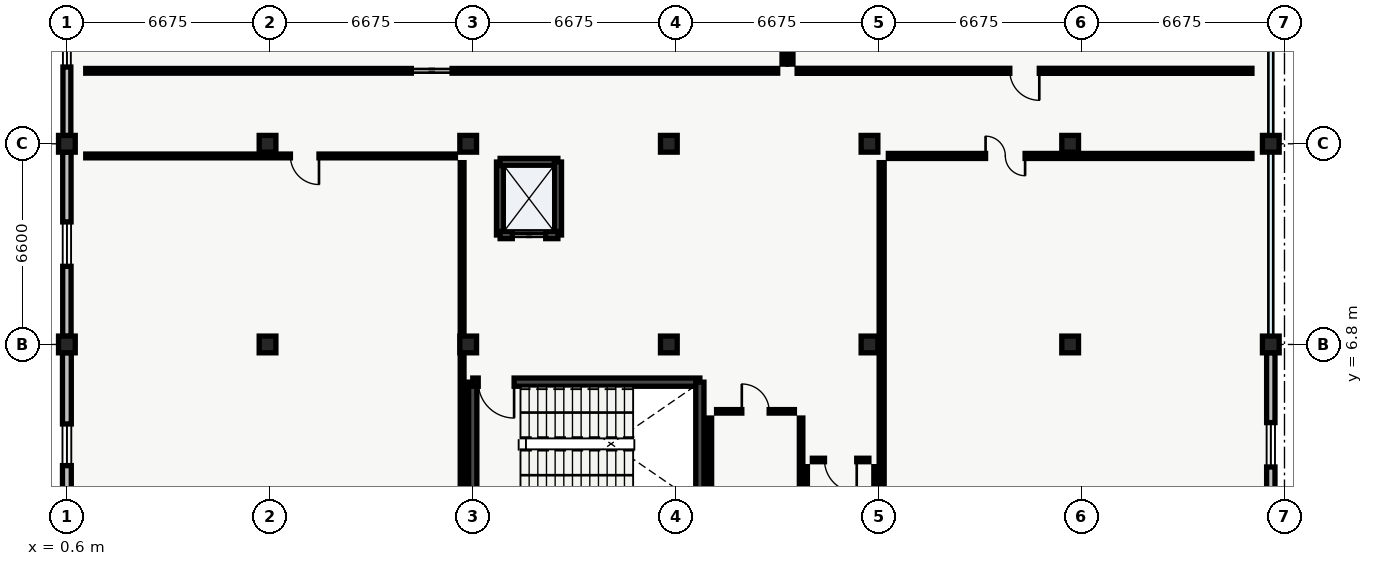
"""IFC4 building model, lengths in metres.
Left out: names, types, materials, properties, quantities, classifications, styles, units other than length and angle.
Written with IfcOpenShell. Run it as: python <this file> out.ifc"""

import sys

from ifc_helpers import new_model, si_unit, direction, frame, frame_2d, origin, origin_2d, place, context, subcontext, project, spatial, rectangle, extrude, element, fill, save


model = new_model("IFC4")
c1 = context("Model", 3, precision=1e-05, world=origin(), true_north=direction((0.0, 1.0)))
c2 = subcontext(c1, "Body", "Model", "MODEL_VIEW")
j1 = project(units=[si_unit("LENGTHUNIT", "METRE"), si_unit("PLANEANGLEUNIT", "RADIAN")], contexts=[c1])
p1 = place(None, origin())
s1 = spatial("IfcSite", under=j1, at=p1, CompositionType="ELEMENT")
p2 = place(p1, origin())
s2 = spatial("IfcBuilding", under=s1, at=p2, CompositionType="ELEMENT")
p3 = place(p2, frame((0.0, 0.0, 14.1)))
s3 = spatial("IfcBuildingStorey", under=s2, at=p3, CompositionType="ELEMENT", Elevation=14.1)
for number, where, z_axis, x_axis in (
    (1, (0.6, 6.8, 0.0), (0.0, 0.0, 1.0), (1.0, 0.0, 0.0)),
    (2, (0.6, 13.4, 0.0), (0.0, 0.0, 1.0), (1.0, 0.0, 0.0)),
    (3, (7.2, 6.8, 0.0), (0.0, 0.0, 1.0), (1.0, 0.0, 0.0)),
    (4, (7.2, 13.4, 0.0), (0.0, 0.0, 1.0), (1.0, 0.0, 0.0)),
    (5, (13.8, 6.8, 0.0), (0.0, 0.0, 1.0), (1.0, 0.0, 0.0)),
    (6, (13.8, 13.4, 0.0), (0.0, 0.0, 1.0), (1.0, 0.0, 0.0)),
    (7, (20.4, 6.8, 0.0), (0.0, 0.0, 1.0), (1.0, 0.0, 0.0)),
    (8, (20.4, 13.4, 0.0), (0.0, 0.0, 1.0), (1.0, 0.0, 0.0)),
    (9, (27.0, 6.8, 0.0), (0.0, 0.0, 1.0), (1.0, 0.0, 0.0)),
    (10, (27.0, 13.4, 0.0), (0.0, 0.0, 1.0), (1.0, 0.0, 0.0)),
    (11, (33.6, 6.8, 0.0), (0.0, 0.0, 1.0), (1.0, 0.0, 0.0)),
    (12, (33.6, 13.4, 0.0), (0.0, 0.0, 1.0), (1.0, 0.0, 0.0)),
    (13, (40.2, 6.8, 0.0), (0.0, 0.0, 1.0), (1.0, 0.0, 0.0)),
    (14, (40.2, 13.4, 0.0), (0.0, 0.0, 1.0), (1.0, 0.0, 0.0)),
):
    element("IfcColumn", number, at=place(p3, frame(where, z_axis=z_axis, x_axis=x_axis)), inside=s3, PredefinedType="COLUMN", context=c2, shape_type="SweptSolid", body=[
        extrude(rectangle(XDim=0.55, YDim=0.55, at=origin_2d()), origin(), (0.0, 0.0, 1.0), 4.3),
    ])
p4 = place(p3, frame((0.6, 0.47, 0.0), z_axis=(0.0, 0.0, 1.0), x_axis=(0.0, 1.0, 0.0)))
e15 = element("IfcWall", 15, at=p4, inside=s3, PredefinedType="STANDARD", context=c2, shape_type="SweptSolid", body=[
    extrude(rectangle(XDim=6.06, YDim=0.29, at=frame_2d((3.03, 0.0))), origin(), (0.0, 0.0, 1.0), 3.785),
])
p5 = place(p4, frame((2.345, 0.0, 0.95)))
e16 = element("IfcOpeningElement", 16, at=p5, cuts=e15, PredefinedType="OPENING", context=c2, shape_type="SweptSolid", body=[
    extrude(rectangle(XDim=1.37, YDim=1.42, at=frame_2d((0.685, 0.71))), frame((0.0, 0.145, 0.0), z_axis=(0.0, -1.0, 0.0), x_axis=(1.0, 0.0, 0.0)), (0.0, 0.0, 1.0), 0.29),
])
p6 = place(p3, frame((0.6, 7.07, 0.0), z_axis=(0.0, 0.0, 1.0), x_axis=(0.0, 1.0, 0.0)))
e17 = element("IfcWall", 17, at=p6, inside=s3, PredefinedType="STANDARD", context=c2, shape_type="SweptSolid", body=[
    extrude(rectangle(XDim=6.06, YDim=0.275, at=frame_2d((3.03, 0.0))), origin(), (0.0, 0.0, 1.0), 3.785),
])
p7 = place(p6, frame((2.3, 0.0, 0.95)))
e18 = element("IfcOpeningElement", 18, at=p7, cuts=e17, PredefinedType="OPENING", context=c2, shape_type="SweptSolid", body=[
    extrude(rectangle(XDim=1.46, YDim=1.44, at=frame_2d((0.73, 0.72))), frame((0.0, 0.137, 0.0), z_axis=(0.0, -1.0, 0.0), x_axis=(1.0, 0.0, 0.0)), (0.0, 0.0, 1.0), 0.275),
])
p8 = place(p3, frame((0.6, 13.67, 0.0), z_axis=(0.0, 0.0, 1.0), x_axis=(0.0, 1.0, 0.0)))
e19 = element("IfcWall", 19, at=p8, inside=s3, PredefinedType="STANDARD", context=c2, shape_type="SweptSolid", body=[
    extrude(rectangle(XDim=6.06, YDim=0.26, at=frame_2d((3.03, 0.0))), origin(), (0.0, 0.0, 1.0), 3.785),
])
p9 = place(p8, frame((2.255, 0.0, 0.95)))
e20 = element("IfcOpeningElement", 20, at=p9, cuts=e19, PredefinedType="OPENING", context=c2, shape_type="SweptSolid", body=[
    extrude(rectangle(XDim=1.55, YDim=1.46, at=frame_2d((0.775, 0.73))), frame((0.0, 0.13, 0.0), z_axis=(0.0, -1.0, 0.0), x_axis=(1.0, 0.0, 0.0)), (0.0, 0.0, 1.0), 0.26),
])
p10 = place(p3, frame((40.2, 6.53, 0.0), z_axis=(0.0, 0.0, 1.0), x_axis=(0.0, -1.0, 0.0)))
e21 = element("IfcWall", 21, at=p10, inside=s3, PredefinedType="STANDARD", context=c2, shape_type="SweptSolid", body=[
    extrude(rectangle(XDim=6.06, YDim=0.275, at=frame_2d((3.03, 0.0))), origin(), (0.0, 0.0, 1.0), 3.785),
])
p11 = place(p10, frame((2.3, 0.0, 0.95)))
e22 = element("IfcOpeningElement", 22, at=p11, cuts=e21, PredefinedType="OPENING", context=c2, shape_type="SweptSolid", body=[
    extrude(rectangle(XDim=1.46, YDim=1.44, at=frame_2d((0.73, 0.72))), frame((0.0, 0.137, 0.0), z_axis=(0.0, -1.0, 0.0), x_axis=(1.0, 0.0, 0.0)), (0.0, 0.0, 1.0), 0.275),
])
p12 = place(p3, frame((13.95, 1.5, 0.0), z_axis=(0.0, 0.0, 1.0), x_axis=(0.0, 1.0, 0.0)))
e23 = element("IfcWall", 23, at=p12, inside=s3, PredefinedType="SHEAR", context=c2, shape_type="SweptSolid", body=[
    extrude(rectangle(XDim=4.06, YDim=0.27, at=frame_2d((2.03, 0.0))), origin(), (0.0, 0.0, 1.0), 4.28),
])
p13 = place(p3, frame((13.95, 5.56, 0.0), z_axis=(0.0, 0.0, 1.0), x_axis=(1.0, 0.0, 0.0)))
e24 = element("IfcWall", 24, at=p13, inside=s3, PredefinedType="SHEAR", context=c2, shape_type="SweptSolid", body=[
    extrude(rectangle(XDim=7.47, YDim=0.27, at=frame_2d((3.735, 0.0))), origin(), (0.0, 0.0, 1.0), 4.28),
])
p14 = place(p13, frame((0.18, 0.0, 0.0)))
e25 = element("IfcOpeningElement", 25, at=p14, cuts=e24, PredefinedType="OPENING", context=c2, shape_type="SweptSolid", body=[
    extrude(rectangle(XDim=1.18, YDim=2.15, at=frame_2d((0.59, 1.075))), frame((0.0, 0.135, 0.0), z_axis=(0.0, -1.0, 0.0), x_axis=(1.0, 0.0, 0.0)), (0.0, 0.0, 1.0), 0.27),
])
p15 = place(p3, frame((21.42, 5.56, 0.0), z_axis=(0.0, 0.0, 1.0), x_axis=(0.0, -1.0, 0.0)))
e26 = element("IfcWall", 26, at=p15, inside=s3, PredefinedType="SHEAR", context=c2, shape_type="SweptSolid", body=[
    extrude(rectangle(XDim=4.06, YDim=0.27, at=frame_2d((2.03, 0.0))), origin(), (0.0, 0.0, 1.0), 4.28),
])
p16 = place(p3, frame((14.85, 10.4, 0.0), z_axis=(0.0, 0.0, 1.0), x_axis=(0.0, 1.0, 0.0)))
e27 = element("IfcWall", 27, at=p16, inside=s3, PredefinedType="SHEAR", context=c2, shape_type="SweptSolid", body=[
    extrude(rectangle(XDim=2.4, YDim=0.24, at=frame_2d((1.2, 0.0))), origin(), (0.0, 0.0, 1.0), 4.28),
])
p17 = place(p3, frame((14.85, 12.8, 0.0), z_axis=(0.0, 0.0, 1.0), x_axis=(1.0, 0.0, 0.0)))
e28 = element("IfcWall", 28, at=p17, inside=s3, PredefinedType="SHEAR", context=c2, shape_type="SweptSolid", body=[
    extrude(rectangle(XDim=1.9, YDim=0.24, at=frame_2d((0.95, 0.0))), origin(), (0.0, 0.0, 1.0), 4.28),
])
p18 = place(p3, frame((16.75, 12.8, 0.0), z_axis=(0.0, 0.0, 1.0), x_axis=(0.0, -1.0, 0.0)))
e29 = element("IfcWall", 29, at=p18, inside=s3, PredefinedType="SHEAR", context=c2, shape_type="SweptSolid", body=[
    extrude(rectangle(XDim=2.4, YDim=0.24, at=frame_2d((1.2, 0.0))), origin(), (0.0, 0.0, 1.0), 4.28),
])
p19 = place(p3, frame((16.75, 10.4, 0.0), z_axis=(0.0, 0.0, 1.0), x_axis=(-1.0, 0.0, 0.0)))
e30 = element("IfcWall", 30, at=p19, inside=s3, PredefinedType="SHEAR", context=c2, shape_type="SweptSolid", body=[
    extrude(rectangle(XDim=1.9, YDim=0.24, at=frame_2d((0.95, 0.0))), origin(), (0.0, 0.0, 1.0), 4.28),
])
p20 = place(p19, frame((0.4, 0.0, 0.0)))
e31 = element("IfcOpeningElement", 31, at=p20, cuts=e30, PredefinedType="OPENING", context=c2, shape_type="SweptSolid", body=[
    extrude(rectangle(XDim=1.1, YDim=2.2, at=frame_2d((0.55, 1.1))), frame((0.0, 0.12, 0.0), z_axis=(0.0, -1.0, 0.0), x_axis=(1.0, 0.0, 0.0)), (0.0, 0.0, 1.0), 0.24),
])
p21 = place(p3, frame((24.75, 0.82, 0.0), z_axis=(0.0, 0.0, 1.0), x_axis=(0.0, 1.0, 0.0)))
e32 = element("IfcWall", 32, at=p21, inside=s3, PredefinedType="PARTITIONING", context=c2, shape_type="SweptSolid", body=[
    extrude(rectangle(XDim=3.56, YDim=0.115, at=frame_2d((1.78, 0.0))), origin(), (0.0, 0.0, 1.0), 3.95),
])
p22 = place(p3, frame((24.53, 4.6, 0.0), z_axis=(0.0, 0.0, 1.0), x_axis=(-1.0, 0.0, 0.0)))
e33 = element("IfcWall", 33, at=p22, inside=s3, PredefinedType="PARTITIONING", context=c2, shape_type="SweptSolid", body=[
    extrude(rectangle(XDim=2.56, YDim=0.115, at=frame_2d((1.28, 0.0))), origin(), (0.0, 0.0, 1.0), 3.95),
])
p23 = place(p22, frame((0.83, 0.0, 0.0)))
e34 = element("IfcOpeningElement", 34, at=p23, cuts=e33, PredefinedType="OPENING", context=c2, shape_type="SweptSolid", body=[
    extrude(rectangle(XDim=0.9, YDim=2.1, at=frame_2d((0.45, 1.05))), frame((0.0, 0.058, 0.0), z_axis=(0.0, -1.0, 0.0), x_axis=(1.0, 0.0, 0.0)), (0.0, 0.0, 1.0), 0.115),
])
p24 = place(p3, frame((21.75, 4.38, 0.0), z_axis=(0.0, 0.0, 1.0), x_axis=(0.0, -1.0, 0.0)))
e35 = element("IfcWall", 35, at=p24, inside=s3, PredefinedType="PARTITIONING", context=c2, shape_type="SweptSolid", body=[
    extrude(rectangle(XDim=3.56, YDim=0.115, at=frame_2d((1.78, 0.0))), origin(), (0.0, 0.0, 1.0), 3.95),
])
p25 = place(p3, frame((27.2, 0.82, 0.0), z_axis=(0.0, 0.0, 1.0), x_axis=(0.0, 1.0, 0.0)))
e36 = element("IfcWall", 36, at=p25, inside=s3, PredefinedType="PARTITIONING", context=c2, shape_type="SweptSolid", body=[
    extrude(rectangle(XDim=1.96, YDim=0.115, at=frame_2d((0.98, 0.0))), origin(), (0.0, 0.0, 1.0), 3.685),
])
p26 = place(p3, frame((26.98, 3.0, 0.0), z_axis=(0.0, 0.0, 1.0), x_axis=(-1.0, 0.0, 0.0)))
e37 = element("IfcWall", 37, at=p26, inside=s3, PredefinedType="PARTITIONING", context=c2, shape_type="SweptSolid", body=[
    extrude(rectangle(XDim=1.86, YDim=0.115, at=frame_2d((0.93, 0.0))), origin(), (0.0, 0.0, 1.0), 3.95),
])
p27 = place(p26, frame((0.4, 0.0, 0.0)))
e38 = element("IfcOpeningElement", 38, at=p27, cuts=e37, PredefinedType="OPENING", context=c2, shape_type="SweptSolid", body=[
    extrude(rectangle(XDim=1.06, YDim=2.12, at=frame_2d((0.53, 1.06))), frame((0.0, 0.058, 0.0), z_axis=(0.0, -1.0, 0.0), x_axis=(1.0, 0.0, 0.0)), (0.0, 0.0, 1.0), 0.115),
])
p28 = place(p3, frame((24.9, 2.78, 0.0), z_axis=(0.0, 0.0, 1.0), x_axis=(0.0, -1.0, 0.0)))
e39 = element("IfcWall", 39, at=p28, inside=s3, PredefinedType="PARTITIONING", context=c2, shape_type="SweptSolid", body=[
    extrude(rectangle(XDim=1.96, YDim=0.115, at=frame_2d((0.98, 0.0))), origin(), (0.0, 0.0, 1.0), 3.95),
])
p29 = place(p3, frame((1.22, 15.8, 0.0), z_axis=(0.0, 0.0, 1.0), x_axis=(1.0, 0.0, 0.0)))
e40 = element("IfcWall", 40, at=p29, inside=s3, PredefinedType="PARTITIONING", context=c2, shape_type="SweptSolid", body=[
    extrude(rectangle(XDim=22.76, YDim=0.155, at=frame_2d((11.38, 0.0))), origin(), (0.0, 0.0, 1.0), 3.885),
])
p30 = place(p29, frame((10.71, 0.0, 0.0)))
e41 = element("IfcOpeningElement", 41, at=p30, cuts=e40, PredefinedType="OPENING", context=c2, shape_type="SweptSolid", body=[
    extrude(rectangle(XDim=1.34, YDim=2.2, at=frame_2d((0.67, 1.1))), frame((0.0, 0.078, 0.0), z_axis=(0.0, -1.0, 0.0), x_axis=(1.0, 0.0, 0.0)), (0.0, 0.0, 1.0), 0.155),
])
p31 = place(p3, frame((24.2, 16.02, 0.0), z_axis=(0.0, 0.0, 1.0), x_axis=(0.0, 1.0, 0.0)))
e42 = element("IfcWall", 42, at=p31, inside=s3, PredefinedType="PARTITIONING", context=c2, shape_type="SweptSolid", body=[
    extrude(rectangle(XDim=9.96, YDim=0.155, at=frame_2d((4.98, 0.0))), origin(), (0.0, 0.0, 1.0), 3.95),
])
p32 = place(p3, frame((24.62, 15.8, 0.0), z_axis=(0.0, 0.0, 1.0), x_axis=(1.0, 0.0, 0.0)))
e43 = element("IfcWall", 43, at=p32, inside=s3, PredefinedType="PARTITIONING", context=c2, shape_type="SweptSolid", body=[
    extrude(rectangle(XDim=14.96, YDim=0.165, at=frame_2d((7.48, 0.0))), origin(), (0.0, 0.0, 1.0), 3.885),
])
p33 = place(p32, frame((6.995, 0.0, 0.0)))
e44 = element("IfcOpeningElement", 44, at=p33, cuts=e43, PredefinedType="OPENING", context=c2, shape_type="SweptSolid", body=[
    extrude(rectangle(XDim=0.97, YDim=2.12, at=frame_2d((0.485, 1.06))), frame((0.0, 0.083, 0.0), z_axis=(0.0, -1.0, 0.0), x_axis=(1.0, 0.0, 0.0)), (0.0, 0.0, 1.0), 0.165),
])
p34 = place(p3, frame((24.4, 25.98, 0.0), z_axis=(0.0, 0.0, 1.0), x_axis=(0.0, -1.0, 0.0)))
e45 = element("IfcWall", 45, at=p34, inside=s3, PredefinedType="PARTITIONING", context=c2, shape_type="SweptSolid", body=[
    extrude(rectangle(XDim=9.96, YDim=0.165, at=frame_2d((4.98, 0.0))), origin(), (0.0, 0.0, 1.0), 3.95),
])
p35 = place(p3, frame((13.6, 0.82, 0.0), z_axis=(0.0, 0.0, 1.0), x_axis=(0.0, 1.0, 0.0)))
e46 = element("IfcWall", 46, at=p35, inside=s3, PredefinedType="PARTITIONING", context=c2, shape_type="SweptSolid", body=[
    extrude(rectangle(XDim=11.96, YDim=0.125, at=frame_2d((5.98, 0.0))), origin(), (0.0, 0.0, 1.0), 3.685),
])
p36 = place(p3, frame((13.38, 13.0, 0.0), z_axis=(0.0, 0.0, 1.0), x_axis=(-1.0, 0.0, 0.0)))
e47 = element("IfcWall", 47, at=p36, inside=s3, PredefinedType="PARTITIONING", context=c2, shape_type="SweptSolid", body=[
    extrude(rectangle(XDim=12.16, YDim=0.125, at=frame_2d((6.08, 0.0))), origin(), (0.0, 0.0, 1.0), 3.95),
])
p37 = place(p36, frame((4.488, 0.0, 0.0)))
e48 = element("IfcOpeningElement", 48, at=p37, cuts=e47, PredefinedType="OPENING", context=c2, shape_type="SweptSolid", body=[
    extrude(rectangle(XDim=0.94, YDim=2.12, at=frame_2d((0.47, 1.06))), frame((0.0, 0.062, 0.0), z_axis=(0.0, -1.0, 0.0), x_axis=(1.0, 0.0, 0.0)), (0.0, 0.0, 1.0), 0.125),
])
p38 = place(p3, frame((39.58, 13.0, 0.0), z_axis=(0.0, 0.0, 1.0), x_axis=(-1.0, 0.0, 0.0)))
e49 = element("IfcWall", 49, at=p38, inside=s3, PredefinedType="PARTITIONING", context=c2, shape_type="SweptSolid", body=[
    extrude(rectangle(XDim=11.96, YDim=0.165, at=frame_2d((5.98, 0.0))), origin(), (0.0, 0.0, 1.0), 3.95),
])
p39 = place(p38, frame((7.462, 0.0, 0.0)))
e50 = element("IfcOpeningElement", 50, at=p39, cuts=e49, PredefinedType="OPENING", context=c2, shape_type="SweptSolid", body=[
    extrude(rectangle(XDim=1.3, YDim=2.18, at=frame_2d((0.65, 1.09))), frame((0.0, 0.083, 0.0), z_axis=(0.0, -1.0, 0.0), x_axis=(1.0, 0.0, 0.0)), (0.0, 0.0, 1.0), 0.165),
])
p40 = place(p3, frame((27.4, 12.78, 0.0), z_axis=(0.0, 0.0, 1.0), x_axis=(0.0, -1.0, 0.0)))
e51 = element("IfcWall", 51, at=p40, inside=s3, PredefinedType="PARTITIONING", context=c2, shape_type="SweptSolid", body=[
    extrude(rectangle(XDim=11.96, YDim=0.165, at=frame_2d((5.98, 0.0))), origin(), (0.0, 0.0, 1.0), 3.95),
])
p41 = place(p5, origin())
e52 = element("IfcWindow", 52, at=p41, inside=s3, PartitioningType="SINGLE_PANEL", PredefinedType="WINDOW", context=c2, shape_type="SweptSolid", body=[
    extrude(rectangle(XDim=1.37, YDim=1.42, at=frame_2d((0.685, 0.71))), frame((0.0, 0.03, 0.0), z_axis=(0.0, -1.0, 0.0), x_axis=(1.0, 0.0, 0.0)), (0.0, 0.0, 1.0), 0.06),
])
fill(e16, e52)
p42 = place(p7, origin())
e53 = element("IfcWindow", 53, at=p42, inside=s3, PartitioningType="SINGLE_PANEL", PredefinedType="WINDOW", context=c2, shape_type="SweptSolid", body=[
    extrude(rectangle(XDim=1.46, YDim=1.44, at=frame_2d((0.73, 0.72))), frame((0.0, 0.03, 0.0), z_axis=(0.0, -1.0, 0.0), x_axis=(1.0, 0.0, 0.0)), (0.0, 0.0, 1.0), 0.06),
])
fill(e18, e53)
p43 = place(p9, origin())
e54 = element("IfcWindow", 54, at=p43, inside=s3, PartitioningType="SINGLE_PANEL", PredefinedType="WINDOW", context=c2, shape_type="SweptSolid", body=[
    extrude(rectangle(XDim=1.55, YDim=1.46, at=frame_2d((0.775, 0.73))), frame((0.0, 0.03, 0.0), z_axis=(0.0, -1.0, 0.0), x_axis=(1.0, 0.0, 0.0)), (0.0, 0.0, 1.0), 0.06),
])
fill(e20, e54)
p44 = place(p11, origin())
e55 = element("IfcWindow", 55, at=p44, inside=s3, PartitioningType="SINGLE_PANEL", PredefinedType="WINDOW", context=c2, shape_type="SweptSolid", body=[
    extrude(rectangle(XDim=1.46, YDim=1.44, at=frame_2d((0.73, 0.72))), frame((0.0, 0.03, 0.0), z_axis=(0.0, -1.0, 0.0), x_axis=(1.0, 0.0, 0.0)), (0.0, 0.0, 1.0), 0.06),
])
fill(e22, e55)
p45 = place(p14, origin())
e56 = element("IfcDoor", 56, at=p45, inside=s3, OperationType="SINGLE_SWING_RIGHT", PredefinedType="DOOR", context=c2, shape_type="SweptSolid", body=[
    extrude(rectangle(XDim=1.18, YDim=2.15, at=frame_2d((0.59, 1.075))), frame((0.0, 0.025, 0.0), z_axis=(0.0, -1.0, 0.0), x_axis=(1.0, 0.0, 0.0)), (0.0, 0.0, 1.0), 0.05),
])
fill(e25, e56)
p46 = place(p20, origin())
e57 = element("IfcDoor", 57, at=p46, inside=s3, OperationType="SLIDING_TO_LEFT", PredefinedType="DOOR", context=c2, shape_type="SweptSolid", body=[
    extrude(rectangle(XDim=1.1, YDim=2.2, at=frame_2d((0.55, 1.1))), frame((0.0, 0.025, 0.0), z_axis=(0.0, -1.0, 0.0), x_axis=(1.0, 0.0, 0.0)), (0.0, 0.0, 1.0), 0.05),
])
fill(e31, e57)
p47 = place(p23, origin())
e58 = element("IfcDoor", 58, at=p47, inside=s3, OperationType="SINGLE_SWING_RIGHT", PredefinedType="DOOR", context=c2, shape_type="SweptSolid", body=[
    extrude(rectangle(XDim=0.9, YDim=2.1, at=frame_2d((0.45, 1.05))), frame((0.0, 0.025, 0.0), z_axis=(0.0, -1.0, 0.0), x_axis=(1.0, 0.0, 0.0)), (0.0, 0.0, 1.0), 0.05),
])
fill(e34, e58)
p48 = place(p27, origin())
e59 = element("IfcDoor", 59, at=p48, inside=s3, OperationType="SINGLE_SWING_LEFT", PredefinedType="DOOR", context=c2, shape_type="SweptSolid", body=[
    extrude(rectangle(XDim=1.06, YDim=2.12, at=frame_2d((0.53, 1.06))), frame((0.0, 0.025, 0.0), z_axis=(0.0, -1.0, 0.0), x_axis=(1.0, 0.0, 0.0)), (0.0, 0.0, 1.0), 0.05),
])
fill(e38, e59)
p49 = place(p30, origin())
e60 = element("IfcDoor", 60, at=p49, inside=s3, OperationType="SLIDING_TO_RIGHT", PredefinedType="DOOR", context=c2, shape_type="SweptSolid", body=[
    extrude(rectangle(XDim=1.34, YDim=2.2, at=frame_2d((0.67, 1.1))), frame((0.0, 0.025, 0.0), z_axis=(0.0, -1.0, 0.0), x_axis=(1.0, 0.0, 0.0)), (0.0, 0.0, 1.0), 0.05),
])
fill(e41, e60)
p50 = place(p33, origin())
e61 = element("IfcDoor", 61, at=p50, inside=s3, OperationType="SINGLE_SWING_RIGHT", PredefinedType="DOOR", context=c2, shape_type="SweptSolid", body=[
    extrude(rectangle(XDim=0.97, YDim=2.12, at=frame_2d((0.485, 1.06))), frame((0.0, 0.025, 0.0), z_axis=(0.0, -1.0, 0.0), x_axis=(1.0, 0.0, 0.0)), (0.0, 0.0, 1.0), 0.05),
])
fill(e44, e61)
p51 = place(p37, origin())
e62 = element("IfcDoor", 62, at=p51, inside=s3, OperationType="SINGLE_SWING_LEFT", PredefinedType="DOOR", context=c2, shape_type="SweptSolid", body=[
    extrude(rectangle(XDim=0.94, YDim=2.12, at=frame_2d((0.47, 1.06))), frame((0.0, 0.025, 0.0), z_axis=(0.0, -1.0, 0.0), x_axis=(1.0, 0.0, 0.0)), (0.0, 0.0, 1.0), 0.05),
])
fill(e48, e62)
p52 = place(p39, origin())
e63 = element("IfcDoor", 63, at=p52, inside=s3, OperationType="DOUBLE_DOOR_SINGLE_SWING", PredefinedType="DOOR", context=c2, shape_type="SweptSolid", body=[
    extrude(rectangle(XDim=1.3, YDim=2.18, at=frame_2d((0.65, 1.09))), frame((0.0, 0.025, 0.0), z_axis=(0.0, -1.0, 0.0), x_axis=(1.0, 0.0, 0.0)), (0.0, 0.0, 1.0), 0.05),
])
fill(e50, e63)
save(model, sys.argv[1])
